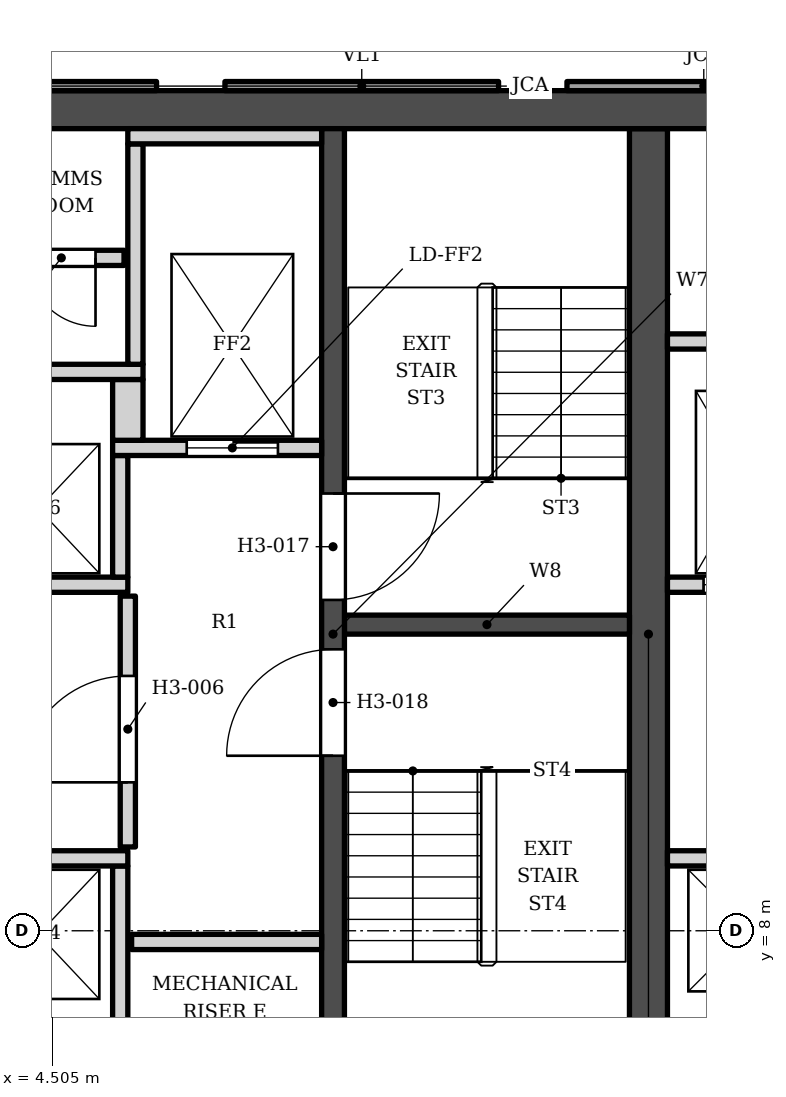
"""IFC4 building model, lengths in metres.
Left out: names, types, materials, properties, quantities, classifications, styles, units other than length and angle.
Written with IfcOpenShell. Run it as: python <this file> out.ifc"""

import sys

from ifc_helpers import new_model, si_unit, direction, frame, frame_2d, origin, place, context, subcontext, project, spatial, polyline, rectangle, outline, extrude, element, fill, save


model = new_model("IFC4")
c1 = context("Model", 3, precision=1e-05, world=origin(), true_north=direction((0.0, 1.0)))
c2 = subcontext(c1, "Body", "Model", "MODEL_VIEW")
j1 = project(units=[si_unit("LENGTHUNIT", "METRE"), si_unit("PLANEANGLEUNIT", "RADIAN")], contexts=[c1])
p1 = place(None, origin())
s1 = spatial("IfcSite", under=j1, at=p1, CompositionType="ELEMENT")
p2 = place(p1, origin())
s2 = spatial("IfcBuilding", under=s1, at=p2, CompositionType="ELEMENT")
p3 = place(p2, frame((0.0, 0.0, 66.4)))
s3 = spatial("IfcBuildingStorey", under=s2, at=p3, CompositionType="ELEMENT", Elevation=66.4)
p4 = place(p3, frame((-16.9, 18.802, 0.0), z_axis=(0.0, 0.0, 1.0), x_axis=(1.0, 0.0, 0.0)))
e1 = element("IfcWall", 1, at=p4, inside=s3, PredefinedType="SHEAR", context=c2, shape_type="SweptSolid", body=[
    extrude(rectangle(XDim=33.8, YDim=0.5, at=frame_2d((16.9, 0.0))), origin(), (0.0, 0.0, 1.0), 3.4),
])
p5 = place(p3, frame((12.35, 5.253, 0.0), z_axis=(0.0, 0.0, 1.0), x_axis=(0.0, 1.0, 0.0)))
e2 = element("IfcWall", 2, at=p5, inside=s3, PredefinedType="SHEAR", context=c2, shape_type="SweptSolid", body=[
    extrude(rectangle(XDim=13.3, YDim=0.5, at=frame_2d((6.65, 0.0))), origin(), (0.0, 0.0, 1.0), 3.4),
])
p6 = place(p3, frame((8.2, 5.253, 0.0), z_axis=(0.0, 0.0, 1.0), x_axis=(0.0, 1.0, 0.0)))
e3 = element("IfcWall", 3, at=p6, inside=s3, PredefinedType="SHEAR", context=c2, shape_type="SweptSolid", body=[
    extrude(rectangle(XDim=13.3, YDim=0.3, at=frame_2d((6.65, 0.0))), origin(), (0.0, 0.0, 1.0), 3.4),
])
p7 = place(p6, frame((7.1, 0.0, 0.0)))
e4 = element("IfcOpeningElement", 4, at=p7, cuts=e3, PredefinedType="OPENING", context=c2, shape_type="SweptSolid", body=[
    extrude(rectangle(XDim=1.4, YDim=2.1, at=frame_2d((0.7, 1.05))), frame((0.0, 0.16, 0.0), z_axis=(0.0, -1.0, 0.0), x_axis=(1.0, 0.0, 0.0)), (0.0, 0.0, 1.0), 0.32),
])
p8 = place(p6, frame((5.05, 0.0, 0.0)))
e5 = element("IfcOpeningElement", 5, at=p8, cuts=e3, PredefinedType="OPENING", context=c2, shape_type="SweptSolid", body=[
    extrude(rectangle(XDim=1.4, YDim=2.1, at=frame_2d((0.7, 1.05))), frame((0.0, 0.16, 0.0), z_axis=(0.0, -1.0, 0.0), x_axis=(1.0, 0.0, 0.0)), (0.0, 0.0, 1.0), 0.32),
])
p9 = place(p3, frame((8.35, 12.028, 0.0), z_axis=(0.0, 0.0, 1.0), x_axis=(1.0, 0.0, 0.0)))
e6 = element("IfcWall", 6, at=p9, inside=s3, PredefinedType="SHEAR", context=c2, shape_type="SweptSolid", body=[
    extrude(rectangle(XDim=3.75, YDim=0.25, at=frame_2d((1.875, 0.0))), origin(), (0.0, 0.0, 1.0), 3.4),
])
p10 = place(p3, origin())
e7 = element("IfcWall", 7, at=p10, inside=s3, PredefinedType="SOLIDWALL", context=c2, shape_type="SweptSolid", body=[
    extrude(outline(polyline([(11.278, 19.173), (11.278, 19.052), (14.878, 19.052), (14.878, 19.173), (11.278, 19.173)])), origin(), (0.0, 0.0, 1.0), 2.65),
])
p11 = place(p3, origin())
e8 = element("IfcWall", 8, at=p11, inside=s3, PredefinedType="ELEMENTEDWALL", context=c2, shape_type="SweptSolid", body=[
    extrude(outline(polyline([(6.778, 19.173), (6.778, 19.052), (10.378, 19.052), (10.378, 19.173), (6.778, 19.173)])), origin(), (0.0, 0.0, 1.0), 2.65),
])
p12 = place(p3, origin())
e9 = element("IfcWall", 9, at=p12, inside=s3, PredefinedType="SOLIDWALL", context=c2, shape_type="SweptSolid", body=[
    extrude(outline(polyline([(2.278, 19.173), (2.278, 19.052), (5.878, 19.052), (5.878, 19.173), (2.278, 19.173)])), origin(), (0.0, 0.0, 1.0), 2.65),
])
for number, where, z_axis, x_axis in (
    (10, (5.4, 6.353, 0.0), (0.0, 0.0, 1.0), (0.0, 1.0, 0.0)),
    (11, (5.55, 7.853, 0.0), (0.0, 0.0, 1.0), (1.0, 0.0, 0.0)),
):
    element("IfcWall", number, at=place(p3, frame(where, z_axis=z_axis, x_axis=x_axis)), inside=s3, PredefinedType="SOLIDWALL", context=c2, shape_type="SweptSolid", body=[
        extrude(rectangle(XDim=2.5, YDim=0.2, at=frame_2d((1.25, 0.0))), origin(), (0.0, 0.0, 1.0), 3.23),
    ])
p13 = place(p3, frame((1.0, 8.953, 0.0), z_axis=(0.0, 0.0, 1.0), x_axis=(1.0, 0.0, 0.0)))
e12 = element("IfcWall", 12, at=p13, inside=s3, PredefinedType="SOLIDWALL", context=c2, shape_type="SweptSolid", body=[
    extrude(rectangle(XDim=4.5, YDim=0.2, at=frame_2d((2.25, 0.0))), origin(), (0.0, 0.0, 1.0), 3.23),
])
p14 = place(p3, frame((12.6, 8.953, 0.0), z_axis=(0.0, 0.0, 1.0), x_axis=(1.0, 0.0, 0.0)))
e13 = element("IfcWall", 13, at=p14, inside=s3, PredefinedType="SOLIDWALL", context=c2, shape_type="SweptSolid", body=[
    extrude(rectangle(XDim=4.3, YDim=0.2, at=frame_2d((2.15, 0.0))), origin(), (0.0, 0.0, 1.0), 3.23),
])
p15 = place(p14, frame((0.525, 0.0, 0.0)))
e14 = element("IfcOpeningElement", 14, at=p15, cuts=e13, PredefinedType="OPENING", context=c2, shape_type="SweptSolid", body=[
    extrude(rectangle(XDim=1.1, YDim=2.1, at=frame_2d((0.55, 1.05))), frame((0.0, 0.11, 0.0), z_axis=(0.0, -1.0, 0.0), x_axis=(1.0, 0.0, 0.0)), (0.0, 0.0, 1.0), 0.22),
])
p16 = place(p14, frame((2.775, 0.0, 0.0)))
e15 = element("IfcOpeningElement", 15, at=p16, cuts=e13, PredefinedType="OPENING", context=c2, shape_type="SweptSolid", body=[
    extrude(rectangle(XDim=1.1, YDim=2.1, at=frame_2d((0.55, 1.05))), frame((0.0, 0.11, 0.0), z_axis=(0.0, -1.0, 0.0), x_axis=(1.0, 0.0, 0.0)), (0.0, 0.0, 1.0), 0.22),
])
p17 = place(p3, frame((5.5, 9.103, 0.0), z_axis=(0.0, 0.0, 1.0), x_axis=(0.0, 1.0, 0.0)))
e16 = element("IfcWall", 16, at=p17, inside=s3, PredefinedType="SOLIDWALL", context=c2, shape_type="SweptSolid", body=[
    extrude(rectangle(XDim=3.3, YDim=0.2, at=frame_2d((1.65, 0.0))), origin(), (0.0, 0.0, 1.0), 3.23),
])
p18 = place(p17, frame((0.85, 0.0, 0.0)))
e17 = element("IfcOpeningElement", 17, at=p18, cuts=e16, PredefinedType="OPENING", context=c2, shape_type="SweptSolid", body=[
    extrude(rectangle(XDim=1.4, YDim=2.1, at=frame_2d((0.7, 1.05))), frame((0.0, 0.11, 0.0), z_axis=(0.0, -1.0, 0.0), x_axis=(1.0, 0.0, 0.0)), (0.0, 0.0, 1.0), 0.22),
])
p19 = place(p3, frame((-1.5, 12.552, 0.0), z_axis=(0.0, 0.0, 1.0), x_axis=(1.0, 0.0, 0.0)))
e18 = element("IfcWall", 18, at=p19, inside=s3, PredefinedType="SOLIDWALL", context=c2, shape_type="SweptSolid", body=[
    extrude(rectangle(XDim=7.0, YDim=0.2, at=frame_2d((3.5, 0.0))), origin(), (0.0, 0.0, 1.0), 3.23),
])
p20 = place(p3, frame((12.6, 12.552, 0.0), z_axis=(0.0, 0.0, 1.0), x_axis=(1.0, 0.0, 0.0)))
e19 = element("IfcWall", 19, at=p20, inside=s3, PredefinedType="SOLIDWALL", context=c2, shape_type="SweptSolid", body=[
    extrude(rectangle(XDim=4.3, YDim=0.2, at=frame_2d((2.15, 0.0))), origin(), (0.0, 0.0, 1.0), 3.23),
])
p21 = place(p20, frame((0.475, 0.0, 0.0)))
e20 = element("IfcOpeningElement", 20, at=p21, cuts=e19, PredefinedType="OPENING", context=c2, shape_type="SweptSolid", body=[
    extrude(rectangle(XDim=1.2, YDim=2.1, at=frame_2d((0.6, 1.05))), frame((0.0, 0.11, 0.0), z_axis=(0.0, -1.0, 0.0), x_axis=(1.0, 0.0, 0.0)), (0.0, 0.0, 1.0), 0.22),
])
p22 = place(p20, frame((2.625, 0.0, 0.0)))
e21 = element("IfcOpeningElement", 21, at=p22, cuts=e19, PredefinedType="OPENING", context=c2, shape_type="SweptSolid", body=[
    extrude(rectangle(XDim=1.4, YDim=2.1, at=frame_2d((0.7, 1.05))), frame((0.0, 0.11, 0.0), z_axis=(0.0, -1.0, 0.0), x_axis=(1.0, 0.0, 0.0)), (0.0, 0.0, 1.0), 0.22),
])
p23 = place(p3, frame((5.4, 12.653, 0.0), z_axis=(0.0, 0.0, 1.0), x_axis=(0.0, 1.0, 0.0)))
e22 = element("IfcWall", 22, at=p23, inside=s3, PredefinedType="SOLIDWALL", context=c2, shape_type="SweptSolid", body=[
    extrude(rectangle(XDim=1.6, YDim=0.2, at=frame_2d((0.8, 0.0))), origin(), (0.0, 0.0, 1.0), 3.23),
])
p24 = place(p3, frame((5.3, 14.353, 0.0), z_axis=(0.0, 0.0, 1.0), x_axis=(1.0, 0.0, 0.0)))
e23 = element("IfcWall", 23, at=p24, inside=s3, PredefinedType="SOLIDWALL", context=c2, shape_type="SweptSolid", body=[
    extrude(rectangle(XDim=2.75, YDim=0.2, at=frame_2d((1.375, 0.0))), origin(), (0.0, 0.0, 1.0), 3.23),
])
p25 = place(p24, frame((0.975, 0.0, 0.0)))
e24 = element("IfcOpeningElement", 24, at=p25, cuts=e23, PredefinedType="OPENING", context=c2, shape_type="SweptSolid", body=[
    extrude(rectangle(XDim=1.2, YDim=2.1, at=frame_2d((0.6, 1.05))), frame((0.0, 0.11, 0.0), z_axis=(0.0, -1.0, 0.0), x_axis=(1.0, 0.0, 0.0)), (0.0, 0.0, 1.0), 0.22),
])
p26 = place(p3, frame((5.5, 14.453, 0.0), z_axis=(0.0, 0.0, 1.0), x_axis=(0.0, 1.0, 0.0)))
e25 = element("IfcWall", 25, at=p26, inside=s3, PredefinedType="SOLIDWALL", context=c2, shape_type="SweptSolid", body=[
    extrude(rectangle(XDim=0.8, YDim=0.4, at=frame_2d((0.4, 0.0))), origin(), (0.0, 0.0, 1.0), 3.23),
])
p27 = place(p3, frame((-1.5, 15.353, 0.0), z_axis=(0.0, 0.0, 1.0), x_axis=(1.0, 0.0, 0.0)))
e26 = element("IfcWall", 26, at=p27, inside=s3, PredefinedType="SOLIDWALL", context=c2, shape_type="SweptSolid", body=[
    extrude(rectangle(XDim=7.2, YDim=0.2, at=frame_2d((3.6, 0.0))), origin(), (0.0, 0.0, 1.0), 3.23),
])
p28 = place(p3, frame((5.6, 15.453, 0.0), z_axis=(0.0, 0.0, 1.0), x_axis=(0.0, 1.0, 0.0)))
e27 = element("IfcWall", 27, at=p28, inside=s3, PredefinedType="SOLIDWALL", context=c2, shape_type="SweptSolid", body=[
    extrude(rectangle(XDim=2.9, YDim=0.2, at=frame_2d((1.45, 0.0))), origin(), (0.0, 0.0, 1.0), 3.23),
])
p29 = place(p3, frame((12.6, 15.753, 0.0), z_axis=(0.0, 0.0, 1.0), x_axis=(1.0, 0.0, 0.0)))
e28 = element("IfcWall", 28, at=p29, inside=s3, PredefinedType="SOLIDWALL", context=c2, shape_type="SweptSolid", body=[
    extrude(rectangle(XDim=4.3, YDim=0.2, at=frame_2d((2.15, 0.0))), origin(), (0.0, 0.0, 1.0), 3.23),
])
p30 = place(p3, frame((-1.6, 16.853, 0.0), z_axis=(0.0, 0.0, 1.0), x_axis=(1.0, 0.0, 0.0)))
e29 = element("IfcWall", 29, at=p30, inside=s3, PredefinedType="SOLIDWALL", context=c2, shape_type="SweptSolid", body=[
    extrude(rectangle(XDim=7.05, YDim=0.2, at=frame_2d((3.525, 0.0))), origin(), (0.0, 0.0, 1.0), 3.23),
])
p31 = place(p30, frame((0.525, 0.0, 0.0)))
e30 = element("IfcOpeningElement", 30, at=p31, cuts=e29, PredefinedType="OPENING", context=c2, shape_type="SweptSolid", body=[
    extrude(rectangle(XDim=0.9, YDim=2.1, at=frame_2d((0.45, 1.05))), frame((0.0, 0.11, 0.0), z_axis=(0.0, -1.0, 0.0), x_axis=(1.0, 0.0, 0.0)), (0.0, 0.0, 1.0), 0.22),
])
p32 = place(p30, frame((3.15, 0.0, 0.0)))
e31 = element("IfcOpeningElement", 31, at=p32, cuts=e29, PredefinedType="OPENING", context=c2, shape_type="SweptSolid", body=[
    extrude(rectangle(XDim=0.9, YDim=2.1, at=frame_2d((0.45, 1.05))), frame((0.0, 0.11, 0.0), z_axis=(0.0, -1.0, 0.0), x_axis=(1.0, 0.0, 0.0)), (0.0, 0.0, 1.0), 0.22),
])
p33 = place(p30, frame((5.775, 0.0, 0.0)))
e32 = element("IfcOpeningElement", 32, at=p33, cuts=e29, PredefinedType="OPENING", context=c2, shape_type="SweptSolid", body=[
    extrude(rectangle(XDim=0.9, YDim=2.1, at=frame_2d((0.45, 1.05))), frame((0.0, 0.11, 0.0), z_axis=(0.0, -1.0, 0.0), x_axis=(1.0, 0.0, 0.0)), (0.0, 0.0, 1.0), 0.22),
])
p34 = place(p3, frame((5.5, 18.453, 0.0), z_axis=(0.0, 0.0, 1.0), x_axis=(1.0, 0.0, 0.0)))
e33 = element("IfcWall", 33, at=p34, inside=s3, PredefinedType="SOLIDWALL", context=c2, shape_type="SweptSolid", body=[
    extrude(rectangle(XDim=2.55, YDim=0.2, at=frame_2d((1.275, 0.0))), origin(), (0.0, 0.0, 1.0), 3.23),
])
p35 = place(p25, origin())
e34 = element("IfcDoor", 34, at=p35, inside=s3, OperationType="DOUBLE_DOOR_SLIDING", PredefinedType="DOOR", context=c2, shape_type="SweptSolid", body=[
    extrude(rectangle(XDim=1.2, YDim=2.1, at=frame_2d((0.6, 1.05))), frame((0.0, 0.025, 0.0), z_axis=(0.0, -1.0, 0.0), x_axis=(1.0, 0.0, 0.0)), (0.0, 0.0, 1.0), 0.05),
])
fill(e24, e34)
p36 = place(p21, origin())
e35 = element("IfcDoor", 35, at=p36, inside=s3, OperationType="DOUBLE_DOOR_SLIDING", PredefinedType="DOOR", context=c2, shape_type="SweptSolid", body=[
    extrude(rectangle(XDim=1.2, YDim=2.1, at=frame_2d((0.6, 1.05))), frame((0.0, 0.025, 0.0), z_axis=(0.0, -1.0, 0.0), x_axis=(1.0, 0.0, 0.0)), (0.0, 0.0, 1.0), 0.05),
])
fill(e20, e35)
p37 = place(p7, origin())
e36 = element("IfcDoor", 36, at=p37, inside=s3, OperationType="SINGLE_SWING_RIGHT", PredefinedType="DOOR", context=c2, shape_type="SweptSolid", body=[
    extrude(rectangle(XDim=1.4, YDim=2.1, at=frame_2d((0.7, 1.05))), frame((0.0, 0.025, 0.0), z_axis=(0.0, -1.0, 0.0), x_axis=(1.0, 0.0, 0.0)), (0.0, 0.0, 1.0), 0.05),
])
fill(e4, e36)
p38 = place(p8, origin())
e37 = element("IfcDoor", 37, at=p38, inside=s3, OperationType="SINGLE_SWING_LEFT", PredefinedType="DOOR", context=c2, shape_type="SweptSolid", body=[
    extrude(rectangle(XDim=1.4, YDim=2.1, at=frame_2d((0.7, 1.05))), frame((0.0, 0.025, 0.0), z_axis=(0.0, -1.0, 0.0), x_axis=(1.0, 0.0, 0.0)), (0.0, 0.0, 1.0), 0.05),
])
fill(e5, e37)
p39 = place(p18, origin())
e38 = element("IfcDoor", 38, at=p39, inside=s3, OperationType="SINGLE_SWING_LEFT", PredefinedType="DOOR", context=c2, shape_type="SweptSolid", body=[
    extrude(rectangle(XDim=1.4, YDim=2.1, at=frame_2d((0.7, 1.05))), frame((0.0, 0.025, 0.0), z_axis=(0.0, -1.0, 0.0), x_axis=(1.0, 0.0, 0.0)), (0.0, 0.0, 1.0), 0.05),
])
fill(e17, e38)
p40 = place(p33, origin())
e39 = element("IfcDoor", 39, at=p40, inside=s3, OperationType="SINGLE_SWING_RIGHT", PredefinedType="DOOR", context=c2, shape_type="SweptSolid", body=[
    extrude(rectangle(XDim=0.9, YDim=2.1, at=frame_2d((0.45, 1.05))), frame((0.0, 0.025, 0.0), z_axis=(0.0, -1.0, 0.0), x_axis=(1.0, 0.0, 0.0)), (0.0, 0.0, 1.0), 0.05),
])
fill(e32, e39)
save(model, sys.argv[1])
